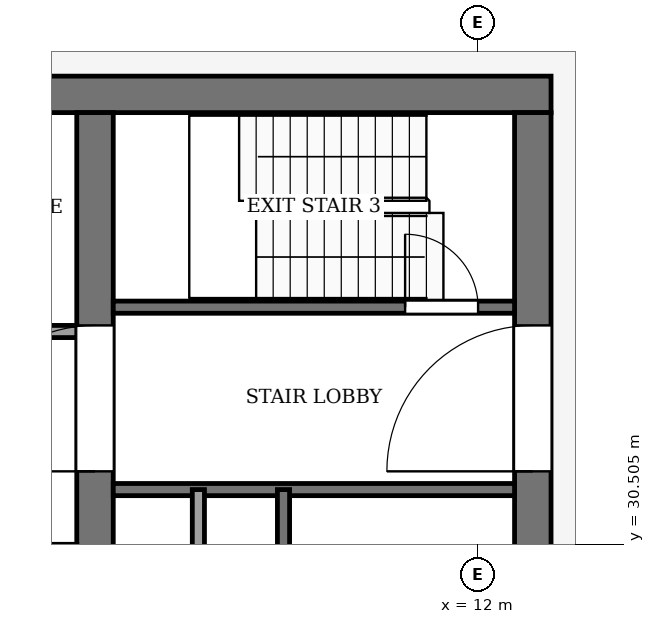
"""IFC4 building model, lengths in metres.
Left out: names, types, materials, properties, quantities, classifications, styles, units other than length and angle.
Written with IfcOpenShell. Run it as: python <this file> out.ifc"""

import sys

from ifc_helpers import new_model, si_unit, direction, frame, frame_2d, origin, place, context, subcontext, project, spatial, rectangle, extrude, element, fill, save


model = new_model("IFC4")
c1 = context("Model", 3, precision=1e-05, world=origin(), true_north=direction((0.0, 1.0)))
c2 = subcontext(c1, "Body", "Model", "MODEL_VIEW")
j1 = project(units=[si_unit("LENGTHUNIT", "METRE"), si_unit("PLANEANGLEUNIT", "RADIAN")], contexts=[c1])
p1 = place(None, origin())
s1 = spatial("IfcSite", under=j1, at=p1, CompositionType="ELEMENT")
p2 = place(p1, origin())
s2 = spatial("IfcBuilding", under=s1, at=p2, CompositionType="ELEMENT")
p3 = place(p2, frame((0.0, 0.0, 302.0)))
s3 = spatial("IfcBuildingStorey", under=s2, at=p3, CompositionType="ELEMENT", Elevation=302.0)
p4 = place(p3, frame((-13.2, 37.9, -0.13), z_axis=(0.0, 0.0, 1.0), x_axis=(1.0, 0.0, 0.0)))
e1 = element("IfcWall", 1, at=p4, inside=s3, PredefinedType="SHEAR", context=c2, shape_type="SweptSolid", body=[
    extrude(rectangle(XDim=26.4, YDim=0.6, at=frame_2d((13.2, 0.0))), origin(), (0.0, 0.0, 1.0), 4.0),
])
p5 = place(p3, frame((12.9, 18.4, -0.13), z_axis=(0.0, 0.0, 1.0), x_axis=(0.0, 1.0, 0.0)))
e2 = element("IfcWall", 2, at=p5, inside=s3, PredefinedType="SHEAR", context=c2, shape_type="SweptSolid", body=[
    extrude(rectangle(XDim=19.2, YDim=0.6, at=frame_2d((9.6, 0.0))), origin(), (0.0, 0.0, 1.0), 4.0),
])
p6 = place(p5, frame((2.8, 0.0, 0.13)))
e3 = element("IfcOpeningElement", 3, at=p6, cuts=e2, PredefinedType="OPENING", context=c2, shape_type="SweptSolid", body=[
    extrude(rectangle(XDim=2.4, YDim=2.4, at=frame_2d((1.2, 1.2))), frame((0.0, 0.31, 0.0), z_axis=(0.0, -1.0, 0.0), x_axis=(1.0, 0.0, 0.0)), (0.0, 0.0, 1.0), 0.62),
])
p7 = place(p5, frame((13.3, 0.0, 0.13)))
e4 = element("IfcOpeningElement", 4, at=p7, cuts=e2, PredefinedType="OPENING", context=c2, shape_type="SweptSolid", body=[
    extrude(rectangle(XDim=2.4, YDim=2.4, at=frame_2d((1.2, 1.2))), frame((0.0, 0.31, 0.0), z_axis=(0.0, -1.0, 0.0), x_axis=(1.0, 0.0, 0.0)), (0.0, 0.0, 1.0), 0.62),
])
p8 = place(p3, frame((5.7, 18.4, -0.13), z_axis=(0.0, 0.0, 1.0), x_axis=(0.0, 1.0, 0.0)))
e5 = element("IfcWall", 5, at=p8, inside=s3, PredefinedType="SHEAR", context=c2, shape_type="SweptSolid", body=[
    extrude(rectangle(XDim=19.2, YDim=0.6, at=frame_2d((9.6, 0.0))), origin(), (0.0, 0.0, 1.0), 4.0),
])
p9 = place(p8, frame((8.35, 0.0, 0.13)))
e6 = element("IfcOpeningElement", 6, at=p9, cuts=e5, PredefinedType="OPENING", context=c2, shape_type="SweptSolid", body=[
    extrude(rectangle(XDim=0.9, YDim=2.1, at=frame_2d((0.45, 1.05))), frame((0.0, 0.31, 0.0), z_axis=(0.0, -1.0, 0.0), x_axis=(1.0, 0.0, 0.0)), (0.0, 0.0, 1.0), 0.62),
])
p10 = place(p8, frame((13.3, 0.0, 0.13)))
e7 = element("IfcOpeningElement", 7, at=p10, cuts=e5, PredefinedType="OPENING", context=c2, shape_type="SweptSolid", body=[
    extrude(rectangle(XDim=2.4, YDim=2.4, at=frame_2d((1.2, 1.2))), frame((0.0, 0.31, 0.0), z_axis=(0.0, -1.0, 0.0), x_axis=(1.0, 0.0, 0.0)), (0.0, 0.0, 1.0), 0.62),
])
p11 = place(p3, frame((6.0, 31.4, 0.0), z_axis=(0.0, 0.0, 1.0), x_axis=(1.0, 0.0, 0.0)))
e8 = element("IfcWall", 8, at=p11, inside=s3, PredefinedType="PARTITIONING", context=c2, shape_type="SweptSolid", body=[
    extrude(rectangle(XDim=6.6, YDim=0.2, at=frame_2d((3.3, 0.0))), origin(), (0.0, 0.0, 1.0), 3.87),
])
p12 = place(p3, frame((-5.4, 34.0, 0.0), z_axis=(0.0, 0.0, 1.0), x_axis=(1.0, 0.0, 0.0)))
e9 = element("IfcWall", 9, at=p12, inside=s3, PredefinedType="PARTITIONING", context=c2, shape_type="SweptSolid", body=[
    extrude(rectangle(XDim=10.8, YDim=0.2, at=frame_2d((5.4, 0.0))), origin(), (0.0, 0.0, 1.0), 3.87),
])
p13 = place(p12, frame((6.15, 0.0, 0.0)))
e10 = element("IfcOpeningElement", 10, at=p13, cuts=e9, PredefinedType="OPENING", context=c2, shape_type="SweptSolid", body=[
    extrude(rectangle(XDim=1.2, YDim=2.2, at=frame_2d((0.6, 1.1))), frame((0.0, 0.11, 0.0), z_axis=(0.0, -1.0, 0.0), x_axis=(1.0, 0.0, 0.0)), (0.0, 0.0, 1.0), 0.22),
])
p14 = place(p12, frame((8.95, 0.0, 0.0)))
e11 = element("IfcOpeningElement", 11, at=p14, cuts=e9, PredefinedType="OPENING", context=c2, shape_type="SweptSolid", body=[
    extrude(rectangle(XDim=1.0, YDim=2.1, at=frame_2d((0.5, 1.05))), frame((0.0, 0.11, 0.0), z_axis=(0.0, -1.0, 0.0), x_axis=(1.0, 0.0, 0.0)), (0.0, 0.0, 1.0), 0.22),
])
p15 = place(p3, frame((6.0, 34.4, 0.0), z_axis=(0.0, 0.0, 1.0), x_axis=(1.0, 0.0, 0.0)))
e12 = element("IfcWall", 12, at=p15, inside=s3, PredefinedType="PARTITIONING", context=c2, shape_type="SweptSolid", body=[
    extrude(rectangle(XDim=6.6, YDim=0.2, at=frame_2d((3.3, 0.0))), origin(), (0.0, 0.0, 1.0), 3.87),
])
p16 = place(p15, frame((4.8, 0.0, 0.0)))
e13 = element("IfcOpeningElement", 13, at=p16, cuts=e12, PredefinedType="OPENING", context=c2, shape_type="SweptSolid", body=[
    extrude(rectangle(XDim=1.2, YDim=2.2, at=frame_2d((0.6, 1.1))), frame((0.0, 0.11, 0.0), z_axis=(0.0, -1.0, 0.0), x_axis=(1.0, 0.0, 0.0)), (0.0, 0.0, 1.0), 0.22),
])
for number, where, z_axis, x_axis in (
    (14, (7.4, 24.0, 0.0), (0.0, 0.0, 1.0), (0.0, 1.0, 0.0)),
    (15, (8.8, 24.0, 0.0), (0.0, 0.0, 1.0), (0.0, 1.0, 0.0)),
):
    element("IfcWall", number, at=place(p3, frame(where, z_axis=z_axis, x_axis=x_axis)), inside=s3, PredefinedType="PARTITIONING", context=c2, shape_type="SweptSolid", body=[
        extrude(rectangle(XDim=7.4, YDim=0.2, at=frame_2d((3.7, 0.0))), origin(), (0.0, 0.0, 1.0), 3.87),
    ])
p17 = place(p16, origin())
e16 = element("IfcDoor", 16, at=p17, inside=s3, OperationType="SINGLE_SWING_RIGHT", PredefinedType="DOOR", context=c2, shape_type="SweptSolid", body=[
    extrude(rectangle(XDim=1.2, YDim=2.2, at=frame_2d((0.6, 1.1))), frame((0.0, 0.025, 0.0), z_axis=(0.0, -1.0, 0.0), x_axis=(1.0, 0.0, 0.0)), (0.0, 0.0, 1.0), 0.05),
])
fill(e13, e16)
p18 = place(p10, origin())
e17 = element("IfcDoor", 17, at=p18, inside=s3, OperationType="DOUBLE_DOOR_SINGLE_SWING", PredefinedType="DOOR", context=c2, shape_type="SweptSolid", body=[
    extrude(rectangle(XDim=2.4, YDim=2.4, at=frame_2d((1.2, 1.2))), frame((0.0, 0.025, 0.0), z_axis=(0.0, -1.0, 0.0), x_axis=(1.0, 0.0, 0.0)), (0.0, 0.0, 1.0), 0.05),
])
fill(e7, e17)
p19 = place(p7, origin())
e18 = element("IfcDoor", 18, at=p19, inside=s3, OperationType="DOUBLE_DOOR_SINGLE_SWING", PredefinedType="DOOR", context=c2, shape_type="SweptSolid", body=[
    extrude(rectangle(XDim=2.4, YDim=2.4, at=frame_2d((1.2, 1.2))), frame((0.0, 0.025, 0.0), z_axis=(0.0, -1.0, 0.0), x_axis=(1.0, 0.0, 0.0)), (0.0, 0.0, 1.0), 0.05),
])
fill(e4, e18)
save(model, sys.argv[1])
